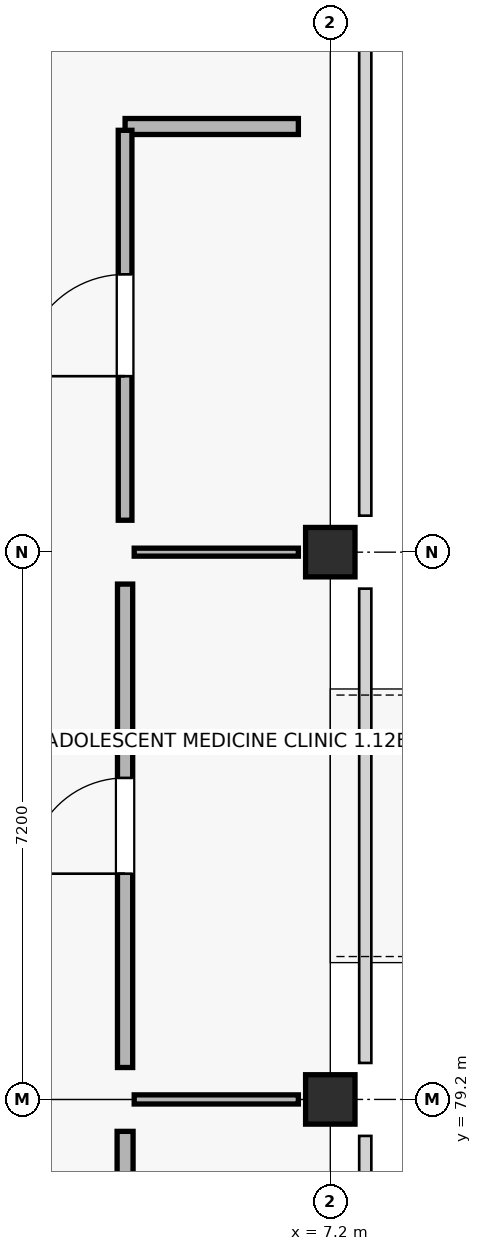
"""IFC4 building model, lengths in metres.
Left out: names, types, materials, properties, quantities, classifications, styles, units other than length and angle.
Written with IfcOpenShell. Run it as: python <this file> out.ifc"""

import sys

from ifc_helpers import new_model, si_unit, direction, frame, frame_2d, origin, origin_2d, place, context, subcontext, project, spatial, rectangle, extrude, element, fill, save


model = new_model("IFC4")
c1 = context("Model", 3, precision=1e-05, world=origin(), true_north=direction((0.0, 1.0)))
c2 = subcontext(c1, "Body", "Model", "MODEL_VIEW")
j1 = project(units=[si_unit("LENGTHUNIT", "METRE"), si_unit("PLANEANGLEUNIT", "RADIAN")], contexts=[c1])
p1 = place(None, origin())
s1 = spatial("IfcSite", under=j1, at=p1, CompositionType="ELEMENT")
p2 = place(p1, origin())
s2 = spatial("IfcBuilding", under=s1, at=p2, CompositionType="ELEMENT")
p3 = place(p2, frame((0.0, 0.0, 9.0)))
s3 = spatial("IfcBuildingStorey", under=s2, at=p3, CompositionType="ELEMENT", Elevation=9.0)
for number, where, z_axis, x_axis in (
    (1, (7.2, 79.2, 0.0), (0.0, 0.0, 1.0), (1.0, 0.0, 0.0)),
    (2, (7.2, 86.4, 0.0), (0.0, 0.0, 1.0), (1.0, 0.0, 0.0)),
):
    element("IfcColumn", number, at=place(p3, frame(where, z_axis=z_axis, x_axis=x_axis)), inside=s3, PredefinedType="COLUMN", context=c2, shape_type="SweptSolid", body=[
        extrude(rectangle(XDim=0.65, YDim=0.65, at=origin_2d()), origin(), (0.0, 0.0, 1.0), 4.5),
    ])
p4 = place(p3, frame((4.5, 72.42, 0.0), z_axis=(0.0, 0.0, 1.0), x_axis=(0.0, 1.0, 0.0)))
e3 = element("IfcWall", 3, at=p4, inside=s3, PredefinedType="PLUMBINGWALL", context=c2, shape_type="SweptSolid", body=[
    extrude(rectangle(XDim=6.36, YDim=0.21, at=frame_2d((3.18, 0.0))), origin(), (0.0, 0.0, 1.0), 3.38),
])
p5 = place(p4, frame((2.59, 0.0, 0.0)))
e4 = element("IfcOpeningElement", 4, at=p5, cuts=e3, PredefinedType="OPENING", context=c2, shape_type="SweptSolid", body=[
    extrude(rectangle(XDim=1.18, YDim=2.04, at=frame_2d((0.59, 1.02))), frame((0.0, 0.115, 0.0), z_axis=(0.0, -1.0, 0.0), x_axis=(1.0, 0.0, 0.0)), (0.0, 0.0, 1.0), 0.23),
])
p6 = place(p3, frame((4.62, 79.2, 0.0), z_axis=(0.0, 0.0, 1.0), x_axis=(1.0, 0.0, 0.0)))
e5 = element("IfcWall", 5, at=p6, inside=s3, PredefinedType="PARTITIONING", context=c2, shape_type="SweptSolid", body=[
    extrude(rectangle(XDim=2.16, YDim=0.12, at=frame_2d((1.08, 0.0))), origin(), (0.0, 0.0, 1.0), 3.38),
])
p7 = place(p3, frame((4.5, 79.62, 0.0), z_axis=(0.0, 0.0, 1.0), x_axis=(0.0, 1.0, 0.0)))
e6 = element("IfcWall", 6, at=p7, inside=s3, PredefinedType="SOLIDWALL", context=c2, shape_type="SweptSolid", body=[
    extrude(rectangle(XDim=6.36, YDim=0.2, at=frame_2d((3.18, 0.0))), origin(), (0.0, 0.0, 1.0), 3.38),
])
p8 = place(p7, frame((2.55, 0.0, 0.0)))
e7 = element("IfcOpeningElement", 7, at=p8, cuts=e6, PredefinedType="OPENING", context=c2, shape_type="SweptSolid", body=[
    extrude(rectangle(XDim=1.26, YDim=2.04, at=frame_2d((0.63, 1.02))), frame((0.0, 0.11, 0.0), z_axis=(0.0, -1.0, 0.0), x_axis=(1.0, 0.0, 0.0)), (0.0, 0.0, 1.0), 0.22),
])
p9 = place(p3, frame((4.62, 86.4, 0.0), z_axis=(0.0, 0.0, 1.0), x_axis=(1.0, 0.0, 0.0)))
e8 = element("IfcWall", 8, at=p9, inside=s3, PredefinedType="PARTITIONING", context=c2, shape_type="SweptSolid", body=[
    extrude(rectangle(XDim=2.16, YDim=0.105, at=frame_2d((1.08, 0.0))), origin(), (0.0, 0.0, 1.0), 3.38),
])
p10 = place(p3, frame((4.5, 92.0, 0.0), z_axis=(0.0, 0.0, 1.0), x_axis=(1.0, 0.0, 0.0)))
e9 = element("IfcWall", 9, at=p10, inside=s3, PredefinedType="PLUMBINGWALL", context=c2, shape_type="SweptSolid", body=[
    extrude(rectangle(XDim=2.28, YDim=0.21, at=frame_2d((1.14, 0.0))), origin(), (0.0, 0.0, 1.0), 3.38),
])
p11 = place(p3, frame((4.5, 86.82, 0.0), z_axis=(0.0, 0.0, 1.0), x_axis=(0.0, 1.0, 0.0)))
e10 = element("IfcWall", 10, at=p11, inside=s3, PredefinedType="PARTITIONING", context=c2, shape_type="SweptSolid", body=[
    extrude(rectangle(XDim=5.13, YDim=0.18, at=frame_2d((2.565, 0.0))), origin(), (0.0, 0.0, 1.0), 3.38),
])
p12 = place(p11, frame((1.895, 0.0, 0.0)))
e11 = element("IfcOpeningElement", 11, at=p12, cuts=e10, PredefinedType="OPENING", context=c2, shape_type="SweptSolid", body=[
    extrude(rectangle(XDim=1.34, YDim=2.04, at=frame_2d((0.67, 1.02))), frame((0.0, 0.1, 0.0), z_axis=(0.0, -1.0, 0.0), x_axis=(1.0, 0.0, 0.0)), (0.0, 0.0, 1.0), 0.2),
])
p13 = place(p8, origin())
e12 = element("IfcDoor", 12, at=p13, inside=s3, OperationType="SINGLE_SWING_LEFT", PredefinedType="DOOR", context=c2, shape_type="SweptSolid", body=[
    extrude(rectangle(XDim=1.26, YDim=2.04, at=frame_2d((0.63, 1.02))), frame((0.0, 0.025, 0.0), z_axis=(0.0, -1.0, 0.0), x_axis=(1.0, 0.0, 0.0)), (0.0, 0.0, 1.0), 0.05),
])
fill(e7, e12)
p14 = place(p12, origin())
e13 = element("IfcDoor", 13, at=p14, inside=s3, OperationType="SINGLE_SWING_LEFT", PredefinedType="DOOR", context=c2, shape_type="SweptSolid", body=[
    extrude(rectangle(XDim=1.34, YDim=2.04, at=frame_2d((0.67, 1.02))), frame((0.0, 0.025, 0.0), z_axis=(0.0, -1.0, 0.0), x_axis=(1.0, 0.0, 0.0)), (0.0, 0.0, 1.0), 0.05),
])
fill(e11, e13)
save(model, sys.argv[1])
